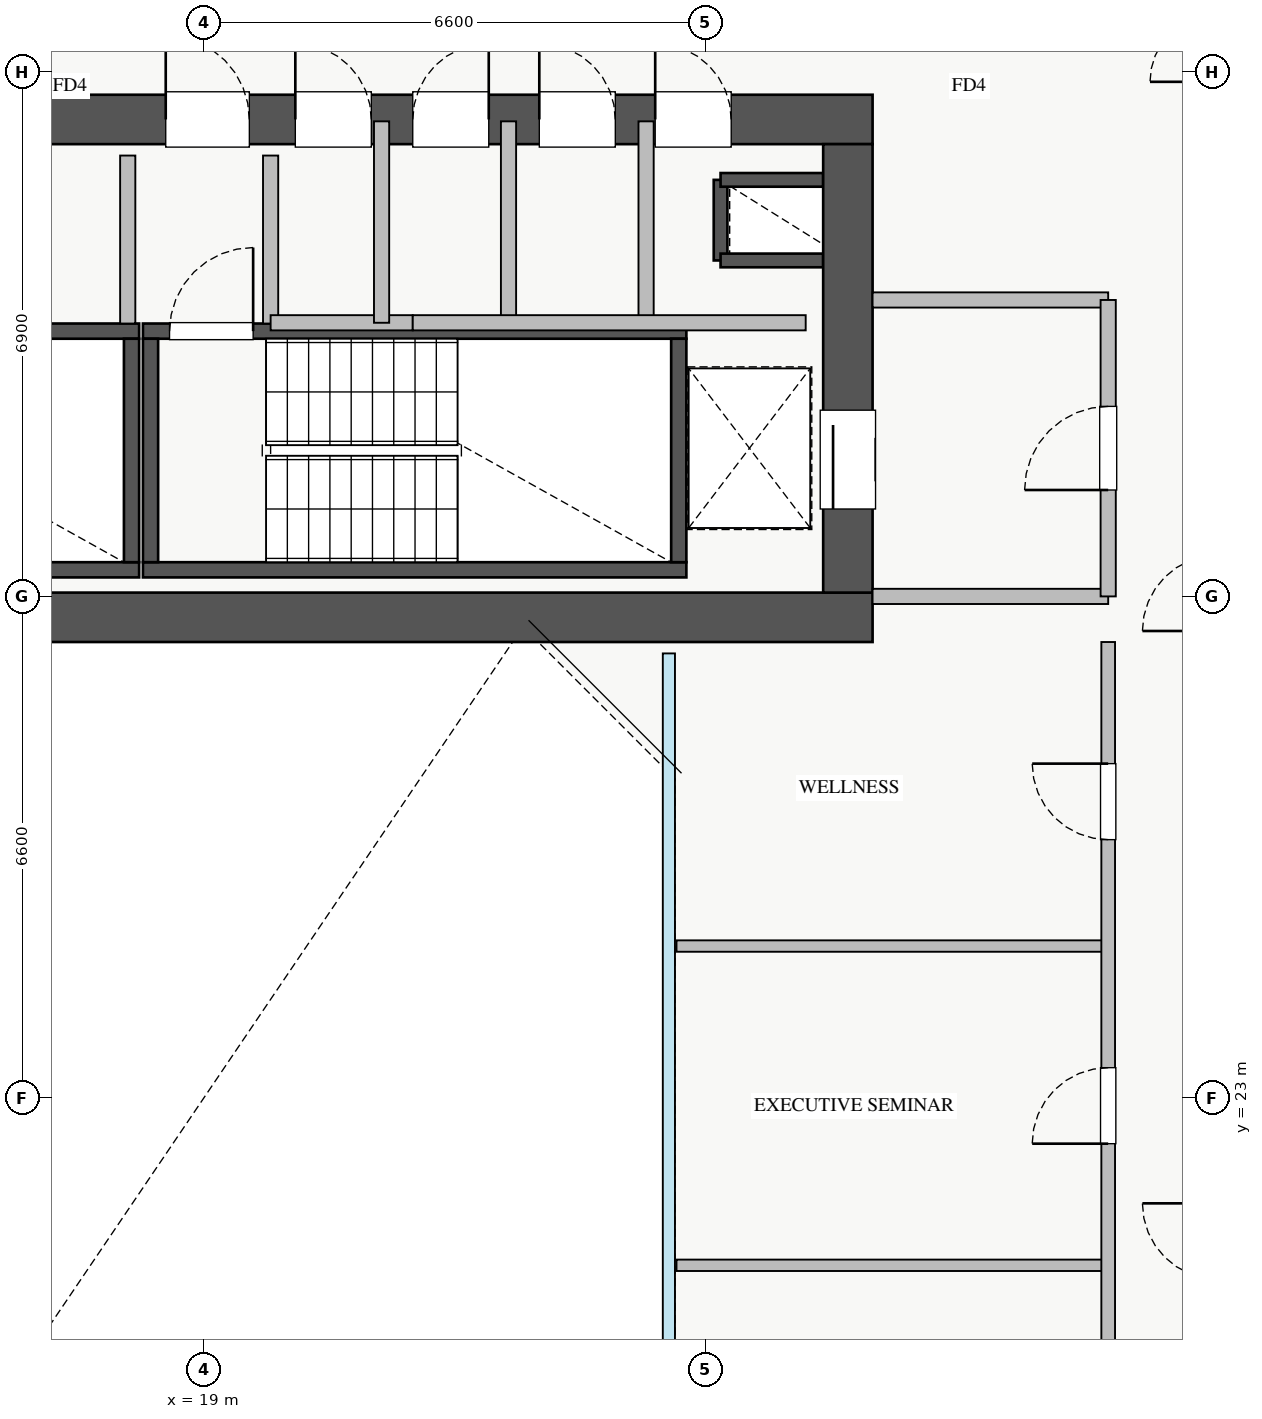
"""IFC4 building model, lengths in metres.
Left out: names, types, materials, properties, quantities, classifications, styles, units other than length and angle.
Written with IfcOpenShell. Run it as: python <this file> out.ifc"""

import sys

from ifc_helpers import new_model, si_unit, direction, frame, frame_2d, origin, place, context, subcontext, project, spatial, rectangle, extrude, source, transform, mapped, element, fill, save


model = new_model("IFC4")
c1 = context("Model", 3, precision=1e-05, world=origin(), true_north=direction((0.0, 1.0)))
c2 = subcontext(c1, "Body", "Model", "MODEL_VIEW")
j1 = project(units=[si_unit("LENGTHUNIT", "METRE"), si_unit("PLANEANGLEUNIT", "RADIAN")], contexts=[c1])
p1 = place(None, origin())
s1 = spatial("IfcSite", under=j1, at=p1, CompositionType="ELEMENT")
p2 = place(p1, origin())
s2 = spatial("IfcBuilding", under=s1, at=p2, CompositionType="ELEMENT")
p3 = place(p2, frame((0.0, 0.0, 182.75)))
s3 = spatial("IfcBuildingStorey", under=s2, at=p3, CompositionType="ELEMENT", Elevation=182.75)
p4 = place(p3, frame((25.8, 34.02, 0.0), z_axis=(0.0, 0.0, 1.0), x_axis=(0.0, 1.0, 0.0)))
e1 = element("IfcWall", 1, at=p4, inside=s3, PredefinedType="SHEAR", context=c2, shape_type="SweptSolid", body=[
    extrude(rectangle(XDim=1.06, YDim=0.18, at=frame_2d((0.53, 0.0))), origin(), (0.0, 0.0, 1.0), 3.03),
])
for number, where, z_axis, x_axis in (
    (2, (25.8, 35.08, 0.0), (0.0, 0.0, 1.0), (1.0, 0.0, 0.0)),
    (3, (25.8, 34.02, 0.0), (0.0, 0.0, 1.0), (1.0, 0.0, 0.0)),
):
    element("IfcWall", number, at=place(p3, frame(where, z_axis=z_axis, x_axis=x_axis)), inside=s3, PredefinedType="SHEAR", context=c2, shape_type="SweptSolid", body=[
        extrude(rectangle(XDim=1.35, YDim=0.18, at=frame_2d((0.675, 0.0))), origin(), (0.0, 0.0, 1.0), 3.03),
    ])
p5 = place(p3, frame((10.85, 29.95, 0.0), z_axis=(0.0, 0.0, 1.0), x_axis=(1.0, 0.0, 0.0)))
e4 = element("IfcWall", 4, at=p5, inside=s3, PredefinedType="SHEAR", context=c2, shape_type="SweptSolid", body=[
    extrude(rectangle(XDim=7.3, YDim=0.2, at=frame_2d((3.65, 0.0))), origin(), (0.0, 0.0, 1.0), 3.25),
])
p6 = place(p3, frame((10.85, 33.09, 0.0), z_axis=(0.0, 0.0, 1.0), x_axis=(1.0, 0.0, 0.0)))
e5 = element("IfcWall", 5, at=p6, inside=s3, PredefinedType="SHEAR", context=c2, shape_type="SweptSolid", body=[
    extrude(rectangle(XDim=7.3, YDim=0.2, at=frame_2d((3.65, 0.0))), origin(), (0.0, 0.0, 1.0), 3.25),
])
p7 = place(p6, frame((0.35, 0.0, 0.0)))
e6 = element("IfcOpeningElement", 6, at=p7, cuts=e5, PredefinedType="OPENING", context=c2, shape_type="SweptSolid", body=[
    extrude(rectangle(XDim=1.1, YDim=2.05, at=frame_2d((0.55, 1.025))), frame((0.0, 0.11, 0.0), z_axis=(0.0, -1.0, 0.0), x_axis=(1.0, 0.0, 0.0)), (0.0, 0.0, 1.0), 0.22),
])
p8 = place(p3, frame((18.05, 30.05, 0.0), z_axis=(0.0, 0.0, 1.0), x_axis=(0.0, 1.0, 0.0)))
e7 = element("IfcWall", 7, at=p8, inside=s3, PredefinedType="SHEAR", context=c2, shape_type="SweptSolid", body=[
    extrude(rectangle(XDim=2.94, YDim=0.2, at=frame_2d((1.47, 0.0))), origin(), (0.0, 0.0, 1.0), 3.25),
])
p9 = place(p3, frame((18.2, 29.95, 0.0), z_axis=(0.0, 0.0, 1.0), x_axis=(1.0, 0.0, 0.0)))
e8 = element("IfcWall", 8, at=p9, inside=s3, PredefinedType="SHEAR", context=c2, shape_type="SweptSolid", body=[
    extrude(rectangle(XDim=7.15, YDim=0.2, at=frame_2d((3.575, 0.0))), origin(), (0.0, 0.0, 1.0), 3.25),
])
p10 = place(p3, frame((18.2, 33.09, 0.0), z_axis=(0.0, 0.0, 1.0), x_axis=(1.0, 0.0, 0.0)))
e9 = element("IfcWall", 9, at=p10, inside=s3, PredefinedType="SHEAR", context=c2, shape_type="SweptSolid", body=[
    extrude(rectangle(XDim=7.15, YDim=0.2, at=frame_2d((3.575, 0.0))), origin(), (0.0, 0.0, 1.0), 3.25),
])
p11 = place(p10, frame((0.35, 0.0, 0.0)))
e10 = element("IfcOpeningElement", 10, at=p11, cuts=e9, PredefinedType="OPENING", context=c2, shape_type="SweptSolid", body=[
    extrude(rectangle(XDim=1.1, YDim=2.05, at=frame_2d((0.55, 1.025))), frame((0.0, 0.11, 0.0), z_axis=(0.0, -1.0, 0.0), x_axis=(1.0, 0.0, 0.0)), (0.0, 0.0, 1.0), 0.22),
])
for number, where, z_axis, x_axis in (
    (11, (18.3, 30.05, 0.0), (0.0, 0.0, 1.0), (0.0, 1.0, 0.0)),
    (12, (25.25, 30.05, 0.0), (0.0, 0.0, 1.0), (0.0, 1.0, 0.0)),
):
    element("IfcWall", number, at=place(p3, frame(where, z_axis=z_axis, x_axis=x_axis)), inside=s3, PredefinedType="SHEAR", context=c2, shape_type="SweptSolid", body=[
        extrude(rectangle(XDim=2.94, YDim=0.2, at=frame_2d((1.47, 0.0))), origin(), (0.0, 0.0, 1.0), 3.25),
    ])
p12 = place(p3, frame((10.2, 29.325, 0.0), z_axis=(0.0, 0.0, 1.0), x_axis=(1.0, 0.0, 0.0)))
e13 = element("IfcWall", 13, at=p12, inside=s3, PredefinedType="SHEAR", context=c2, shape_type="SweptSolid", body=[
    extrude(rectangle(XDim=17.6, YDim=0.65, at=frame_2d((8.8, 0.0))), origin(), (0.0, 0.0, 1.0), 3.25),
])
p13 = place(p3, frame((10.2, 35.875, 0.0), z_axis=(0.0, 0.0, 1.0), x_axis=(1.0, 0.0, 0.0)))
e14 = element("IfcWall", 14, at=p13, inside=s3, PredefinedType="SHEAR", context=c2, shape_type="SweptSolid", body=[
    extrude(rectangle(XDim=17.6, YDim=0.65, at=frame_2d((8.8, 0.0))), origin(), (0.0, 0.0, 1.0), 3.25),
])
p14 = place(p13, frame((1.15, 0.0, 0.0)))
e15 = element("IfcOpeningElement", 15, at=p14, cuts=e14, PredefinedType="OPENING", context=c2, shape_type="SweptSolid", body=[
    extrude(rectangle(XDim=1.1, YDim=2.05, at=frame_2d((0.55, 1.025))), frame((0.0, 0.335, 0.0), z_axis=(0.0, -1.0, 0.0), x_axis=(1.0, 0.0, 0.0)), (0.0, 0.0, 1.0), 0.67),
])
p15 = place(p13, frame((8.3, 0.0, 0.0)))
e16 = element("IfcOpeningElement", 16, at=p15, cuts=e14, PredefinedType="OPENING", context=c2, shape_type="SweptSolid", body=[
    extrude(rectangle(XDim=1.1, YDim=2.05, at=frame_2d((0.55, 1.025))), frame((0.0, 0.335, 0.0), z_axis=(0.0, -1.0, 0.0), x_axis=(1.0, 0.0, 0.0)), (0.0, 0.0, 1.0), 0.67),
])
p16 = place(p13, frame((4.9, 0.0, 0.0)))
e17 = element("IfcOpeningElement", 17, at=p16, cuts=e14, PredefinedType="OPENING", context=c2, shape_type="SweptSolid", body=[
    extrude(rectangle(XDim=1.1, YDim=2.05, at=frame_2d((0.55, 1.025))), frame((0.0, 0.335, 0.0), z_axis=(0.0, -1.0, 0.0), x_axis=(1.0, 0.0, 0.0)), (0.0, 0.0, 1.0), 0.67),
])
p17 = place(p13, frame((14.74, 0.0, 0.0)))
e18 = element("IfcOpeningElement", 18, at=p17, cuts=e14, PredefinedType="OPENING", context=c2, shape_type="SweptSolid", body=[
    extrude(rectangle(XDim=1.0, YDim=2.05, at=frame_2d((0.5, 1.025))), frame((0.0, 0.335, 0.0), z_axis=(0.0, -1.0, 0.0), x_axis=(1.0, 0.0, 0.0)), (0.0, 0.0, 1.0), 0.67),
])
p18 = place(p13, frame((10.005, 0.0, 0.0)))
e19 = element("IfcOpeningElement", 19, at=p18, cuts=e14, PredefinedType="OPENING", context=c2, shape_type="SweptSolid", body=[
    extrude(rectangle(XDim=1.0, YDim=2.05, at=frame_2d((0.5, 1.025))), frame((0.0, 0.335, 0.0), z_axis=(0.0, -1.0, 0.0), x_axis=(1.0, 0.0, 0.0)), (0.0, 0.0, 1.0), 0.67),
])
p19 = place(p13, frame((11.55, 0.0, 0.0)))
e20 = element("IfcOpeningElement", 20, at=p19, cuts=e14, PredefinedType="OPENING", context=c2, shape_type="SweptSolid", body=[
    extrude(rectangle(XDim=1.0, YDim=2.05, at=frame_2d((0.5, 1.025))), frame((0.0, 0.335, 0.0), z_axis=(0.0, -1.0, 0.0), x_axis=(1.0, 0.0, 0.0)), (0.0, 0.0, 1.0), 0.67),
])
p20 = place(p13, frame((13.215, 0.0, 0.0)))
e21 = element("IfcOpeningElement", 21, at=p20, cuts=e14, PredefinedType="OPENING", context=c2, shape_type="SweptSolid", body=[
    extrude(rectangle(XDim=1.0, YDim=2.05, at=frame_2d((0.5, 1.025))), frame((0.0, 0.335, 0.0), z_axis=(0.0, -1.0, 0.0), x_axis=(1.0, 0.0, 0.0)), (0.0, 0.0, 1.0), 0.67),
])
p21 = place(p3, frame((27.475, 29.65, 0.0), z_axis=(0.0, 0.0, 1.0), x_axis=(0.0, 1.0, 0.0)))
e22 = element("IfcWall", 22, at=p21, inside=s3, PredefinedType="SHEAR", context=c2, shape_type="SweptSolid", body=[
    extrude(rectangle(XDim=5.9, YDim=0.65, at=frame_2d((2.95, 0.0))), origin(), (0.0, 0.0, 1.0), 3.25),
])
p22 = place(p21, frame((1.1, 0.0, 0.0)))
e23 = element("IfcOpeningElement", 23, at=p22, cuts=e22, PredefinedType="OPENING", context=c2, shape_type="SweptSolid", body=[
    extrude(rectangle(XDim=1.3, YDim=2.05, at=frame_2d((0.65, 1.025))), frame((0.0, 0.335, 0.0), z_axis=(0.0, -1.0, 0.0), x_axis=(1.0, 0.0, 0.0)), (0.0, 0.0, 1.0), 0.67),
])
for number, where, z_axis, x_axis in (
    (24, (27.8, 29.6, 0.0), (0.0, 0.0, 1.0), (1.0, 0.0, 0.0)),
    (25, (27.8, 33.5, 0.0), (0.0, 0.0, 1.0), (1.0, 0.0, 0.0)),
):
    element("IfcWall", number, at=place(p3, frame(where, z_axis=z_axis, x_axis=x_axis)), inside=s3, PredefinedType="PARTITIONING", context=c2, shape_type="SweptSolid", body=[
        extrude(rectangle(XDim=3.1, YDim=0.2, at=frame_2d((1.55, 0.0))), origin(), (0.0, 0.0, 1.0), 3.03),
    ])
p23 = place(p3, frame((30.9, 29.6, 0.0), z_axis=(0.0, 0.0, 1.0), x_axis=(0.0, 1.0, 0.0)))
e26 = element("IfcWall", 26, at=p23, inside=s3, PredefinedType="PARTITIONING", context=c2, shape_type="SweptSolid", body=[
    extrude(rectangle(XDim=3.9, YDim=0.2, at=frame_2d((1.95, 0.0))), origin(), (0.0, 0.0, 1.0), 3.03),
])
p24 = place(p23, frame((1.4, 0.0, 0.0)))
e27 = element("IfcOpeningElement", 27, at=p24, cuts=e26, PredefinedType="OPENING", context=c2, shape_type="SweptSolid", body=[
    extrude(rectangle(XDim=1.1, YDim=2.05, at=frame_2d((0.55, 1.025))), frame((0.0, 0.11, 0.0), z_axis=(0.0, -1.0, 0.0), x_axis=(1.0, 0.0, 0.0)), (0.0, 0.0, 1.0), 0.22),
])
for number, where, z_axis, x_axis in (
    (28, (18.0, 33.19, 0.0), (0.0, 0.0, 1.0), (0.0, 1.0, 0.0)),
    (29, (19.88, 33.19, 0.0), (0.0, 0.0, 1.0), (0.0, 1.0, 0.0)),
):
    element("IfcWall", number, at=place(p3, frame(where, z_axis=z_axis, x_axis=x_axis)), inside=s3, PredefinedType="PARTITIONING", context=c2, shape_type="SweptSolid", body=[
        extrude(rectangle(XDim=2.21, YDim=0.2, at=frame_2d((1.105, 0.0))), origin(), (0.0, 0.0, 1.0), 3.03),
    ])
p25 = place(p3, frame((24.82, 33.2, 0.0), z_axis=(0.0, 0.0, 1.0), x_axis=(0.0, 1.0, 0.0)))
e30 = element("IfcWall", 30, at=p25, inside=s3, PredefinedType="PARTITIONING", context=c2, shape_type="SweptSolid", body=[
    extrude(rectangle(XDim=2.65, YDim=0.2, at=frame_2d((1.325, 0.0))), origin(), (0.0, 0.0, 1.0), 3.03),
])
p26 = place(p3, frame((19.88, 33.2, 0.0), z_axis=(0.0, 0.0, 1.0), x_axis=(1.0, 0.0, 0.0)))
e31 = element("IfcWall", 31, at=p26, inside=s3, PredefinedType="PARTITIONING", context=c2, shape_type="SweptSolid", body=[
    extrude(rectangle(XDim=1.87, YDim=0.2, at=frame_2d((0.935, 0.0))), origin(), (0.0, 0.0, 1.0), 3.03),
])
for number, where, z_axis, x_axis in (
    (32, (21.34, 33.2, 0.0), (0.0, 0.0, 1.0), (0.0, 1.0, 0.0)),
    (33, (23.01, 33.2, 0.0), (0.0, 0.0, 1.0), (0.0, 1.0, 0.0)),
):
    element("IfcWall", number, at=place(p3, frame(where, z_axis=z_axis, x_axis=x_axis)), inside=s3, PredefinedType="PARTITIONING", context=c2, shape_type="SweptSolid", body=[
        extrude(rectangle(XDim=2.65, YDim=0.2, at=frame_2d((1.325, 0.0))), origin(), (0.0, 0.0, 1.0), 3.03),
    ])
p27 = place(p3, frame((21.75, 33.2, 0.0), z_axis=(0.0, 0.0, 1.0), x_axis=(1.0, 0.0, 0.0)))
e34 = element("IfcWall", 34, at=p27, inside=s3, PredefinedType="PARTITIONING", context=c2, shape_type="SweptSolid", body=[
    extrude(rectangle(XDim=5.17, YDim=0.2, at=frame_2d((2.585, 0.0))), origin(), (0.0, 0.0, 1.0), 3.03),
])
for number, where, z_axis, x_axis in (
    (35, (25.22, 20.8, 0.0), (0.0, 0.0, 1.0), (1.0, 0.0, 0.0)),
    (36, (25.22, 25.0, 0.0), (0.0, 0.0, 1.0), (1.0, 0.0, 0.0)),
):
    element("IfcWall", number, at=place(p3, frame(where, z_axis=z_axis, x_axis=x_axis)), inside=s3, PredefinedType="PARTITIONING", context=c2, shape_type="SweptSolid", body=[
        extrude(rectangle(XDim=5.68, YDim=0.15, at=frame_2d((2.84, 0.0))), origin(), (0.0, 0.0, 1.0), 3.03),
    ])
p28 = place(p3, frame((30.9, 17.0, 0.0), z_axis=(0.0, 0.0, 1.0), x_axis=(0.0, 1.0, 0.0)))
e37 = element("IfcWall", 37, at=p28, inside=s3, PredefinedType="PARTITIONING", context=c2, shape_type="SweptSolid", body=[
    extrude(rectangle(XDim=12.0, YDim=0.18, at=frame_2d((6.0, 0.0))), origin(), (0.0, 0.0, 1.0), 3.03),
])
p29 = place(p28, frame((1.4, 0.0, 0.0)))
e38 = element("IfcOpeningElement", 38, at=p29, cuts=e37, PredefinedType="OPENING", context=c2, shape_type="SweptSolid", body=[
    extrude(rectangle(XDim=1.0, YDim=2.05, at=frame_2d((0.5, 1.025))), frame((0.0, 0.1, 0.0), z_axis=(0.0, -1.0, 0.0), x_axis=(1.0, 0.0, 0.0)), (0.0, 0.0, 1.0), 0.2),
])
p30 = place(p28, frame((5.4, 0.0, 0.0)))
e39 = element("IfcOpeningElement", 39, at=p30, cuts=e37, PredefinedType="OPENING", context=c2, shape_type="SweptSolid", body=[
    extrude(rectangle(XDim=1.0, YDim=2.05, at=frame_2d((0.5, 1.025))), frame((0.0, 0.1, 0.0), z_axis=(0.0, -1.0, 0.0), x_axis=(1.0, 0.0, 0.0)), (0.0, 0.0, 1.0), 0.2),
])
p31 = place(p28, frame((9.4, 0.0, 0.0)))
e40 = element("IfcOpeningElement", 40, at=p31, cuts=e37, PredefinedType="OPENING", context=c2, shape_type="SweptSolid", body=[
    extrude(rectangle(XDim=1.0, YDim=2.05, at=frame_2d((0.5, 1.025))), frame((0.0, 0.1, 0.0), z_axis=(0.0, -1.0, 0.0), x_axis=(1.0, 0.0, 0.0)), (0.0, 0.0, 1.0), 0.2),
])
m1 = source(origin(), c2, "Body", "SweptSolid", [
    extrude(rectangle(XDim=1.3, YDim=2.05, at=frame_2d((0.65, 1.025))), frame((0.0, 0.025, 0.0), z_axis=(0.0, -1.0, 0.0), x_axis=(1.0, 0.0, 0.0)), (0.0, 0.0, 1.0), 0.05),
])
p32 = place(p22, origin())
e41 = element("IfcDoor", 41, at=p32, inside=s3, OperationType="SLIDING_TO_LEFT", PredefinedType="DOOR", context=c2, shape_type="MappedRepresentation", body=[
    mapped(m1, transform((0.0, 0.0, 0.0), x_axis=(1.0, 0.0, 0.0), y_axis=(0.0, 1.0, 0.0), z_axis=(0.0, 0.0, 1.0), scale=1.0)),
])
fill(e23, e41)
m2 = source(origin(), c2, "Body", "SweptSolid", [
    extrude(rectangle(XDim=1.1, YDim=2.05, at=frame_2d((0.55, 1.025))), frame((0.0, 0.025, 0.0), z_axis=(0.0, -1.0, 0.0), x_axis=(1.0, 0.0, 0.0)), (0.0, 0.0, 1.0), 0.05),
])
p33 = place(p15, origin())
e42 = element("IfcDoor", 42, at=p33, inside=s3, OperationType="SINGLE_SWING_LEFT", PredefinedType="DOOR", context=c2, shape_type="MappedRepresentation", body=[
    mapped(m2, transform((0.0, 0.0, 0.0), x_axis=(1.0, 0.0, 0.0), y_axis=(0.0, 1.0, 0.0), z_axis=(0.0, 0.0, 1.0), scale=1.0)),
])
fill(e16, e42)
p34 = place(p11, origin())
e43 = element("IfcDoor", 43, at=p34, inside=s3, OperationType="SINGLE_SWING_RIGHT", PredefinedType="DOOR", context=c2, shape_type="MappedRepresentation", body=[
    mapped(m2, transform((0.0, 0.0, 0.0), x_axis=(1.0, 0.0, 0.0), y_axis=(0.0, 1.0, 0.0), z_axis=(0.0, 0.0, 1.0), scale=1.0)),
])
fill(e10, e43)
m3 = source(origin(), c2, "Body", "SweptSolid", [
    extrude(rectangle(XDim=1.0, YDim=2.05, at=frame_2d((0.5, 1.025))), frame((0.0, 0.025, 0.0), z_axis=(0.0, -1.0, 0.0), x_axis=(1.0, 0.0, 0.0)), (0.0, 0.0, 1.0), 0.05),
])
p35 = place(p17, origin())
e44 = element("IfcDoor", 44, at=p35, inside=s3, OperationType="SINGLE_SWING_LEFT", PredefinedType="DOOR", context=c2, shape_type="MappedRepresentation", body=[
    mapped(m3, transform((0.0, 0.0, 0.0), x_axis=(1.0, 0.0, 0.0), y_axis=(0.0, 1.0, 0.0), z_axis=(0.0, 0.0, 1.0), scale=1.0)),
])
fill(e18, e44)
p36 = place(p18, origin())
e45 = element("IfcDoor", 45, at=p36, inside=s3, OperationType="SINGLE_SWING_LEFT", PredefinedType="DOOR", context=c2, shape_type="MappedRepresentation", body=[
    mapped(m3, transform((0.0, 0.0, 0.0), x_axis=(1.0, 0.0, 0.0), y_axis=(0.0, 1.0, 0.0), z_axis=(0.0, 0.0, 1.0), scale=1.0)),
])
fill(e19, e45)
p37 = place(p19, origin())
e46 = element("IfcDoor", 46, at=p37, inside=s3, OperationType="SINGLE_SWING_RIGHT", PredefinedType="DOOR", context=c2, shape_type="MappedRepresentation", body=[
    mapped(m3, transform((0.0, 0.0, 0.0), x_axis=(1.0, 0.0, 0.0), y_axis=(0.0, 1.0, 0.0), z_axis=(0.0, 0.0, 1.0), scale=1.0)),
])
fill(e20, e46)
p38 = place(p20, origin())
e47 = element("IfcDoor", 47, at=p38, inside=s3, OperationType="SINGLE_SWING_LEFT", PredefinedType="DOOR", context=c2, shape_type="MappedRepresentation", body=[
    mapped(m3, transform((0.0, 0.0, 0.0), x_axis=(1.0, 0.0, 0.0), y_axis=(0.0, 1.0, 0.0), z_axis=(0.0, 0.0, 1.0), scale=1.0)),
])
fill(e21, e47)
p39 = place(p24, origin())
e48 = element("IfcDoor", 48, at=p39, inside=s3, OperationType="SINGLE_SWING_LEFT", PredefinedType="DOOR", context=c2, shape_type="MappedRepresentation", body=[
    mapped(m2, transform((0.0, 0.0, 0.0), x_axis=(1.0, 0.0, 0.0), y_axis=(0.0, 1.0, 0.0), z_axis=(0.0, 0.0, 1.0), scale=1.0)),
])
fill(e27, e48)
p40 = place(p30, origin())
e49 = element("IfcDoor", 49, at=p40, inside=s3, OperationType="SINGLE_SWING_LEFT", PredefinedType="DOOR", context=c2, shape_type="MappedRepresentation", body=[
    mapped(m3, transform((0.0, 0.0, 0.0), x_axis=(1.0, 0.0, 0.0), y_axis=(0.0, 1.0, 0.0), z_axis=(0.0, 0.0, 1.0), scale=1.0)),
])
fill(e39, e49)
p41 = place(p31, origin())
e50 = element("IfcDoor", 50, at=p41, inside=s3, OperationType="SINGLE_SWING_RIGHT", PredefinedType="DOOR", context=c2, shape_type="MappedRepresentation", body=[
    mapped(m3, transform((0.0, 0.0, 0.0), x_axis=(1.0, 0.0, 0.0), y_axis=(0.0, 1.0, 0.0), z_axis=(0.0, 0.0, 1.0), scale=1.0)),
])
fill(e40, e50)
save(model, sys.argv[1])
